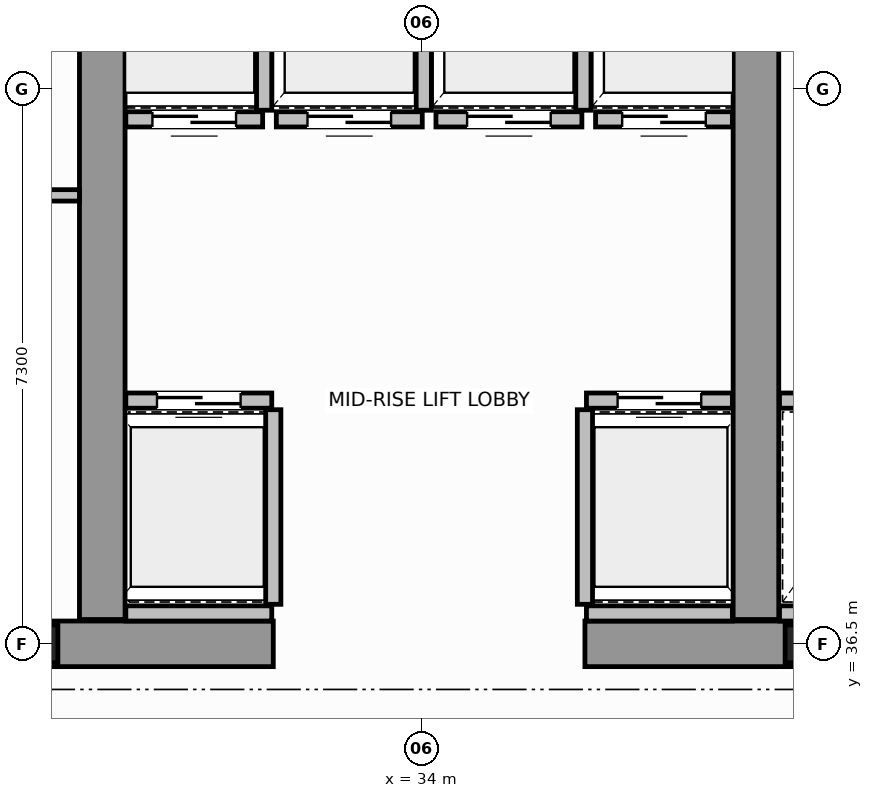
"""IFC4 building model, lengths in metres.
Left out: names, types, materials, properties, quantities, classifications, styles, units other than length and angle.
Written with IfcOpenShell. Run it as: python <this file> out.ifc"""

import sys

from ifc_helpers import new_model, si_unit, direction, frame, frame_2d, origin, origin_2d, place, context, subcontext, project, spatial, rectangle, i_section, extrude, source, transform, mapped, element, fill, save


model = new_model("IFC4")
c1 = context("Model", 3, precision=1e-05, world=origin(), true_north=direction((0.0, 1.0)))
c2 = subcontext(c1, "Body", "Model", "MODEL_VIEW")
j1 = project(units=[si_unit("LENGTHUNIT", "METRE"), si_unit("PLANEANGLEUNIT", "RADIAN")], contexts=[c1])
p1 = place(None, origin())
s1 = spatial("IfcSite", under=j1, at=p1, CompositionType="ELEMENT")
p2 = place(p1, origin())
s2 = spatial("IfcBuilding", under=s1, at=p2, CompositionType="ELEMENT")
p3 = place(p2, frame((0.0, 0.0, 172.8)))
s3 = spatial("IfcBuildingStorey", under=s2, at=p3, CompositionType="ELEMENT", Elevation=172.8)
m1 = source(origin(), c2, "Body", "SweptSolid", [
    extrude(i_section(OverallWidth=0.432, OverallDepth=0.498, WebThickness=0.055, FlangeThickness=0.068, FilletRadius=0.015, at=origin_2d()), origin(), (0.0, 0.0, 1.0), 3.8),
])
for number, where, z_axis, x_axis in (
    (1, (29.0, 36.5, 0.0), (0.0, 0.0, 1.0), (1.0, 0.0, 0.0)),
    (2, (39.0, 36.5, 0.0), (0.0, 0.0, 1.0), (1.0, 0.0, 0.0)),
):
    element("IfcColumn", number, at=place(p3, frame(where, z_axis=z_axis, x_axis=x_axis)), inside=s3, PredefinedType="COLUMN", context=c2, shape_type="MappedRepresentation", body=[
        mapped(m1, transform((0.0, 0.0, 0.0), scale=1.0)),
    ])
for number, where, z_axis, x_axis in (
    (3, (27.55, 36.5, 0.0), (0.0, 0.0, 1.0), (1.0, 0.0, 0.0)),
    (4, (36.15, 36.5, 0.0), (0.0, 0.0, 1.0), (1.0, 0.0, 0.0)),
):
    element("IfcWall", number, at=place(p3, frame(where, z_axis=z_axis, x_axis=x_axis)), inside=s3, PredefinedType="SHEAR", context=c2, shape_type="SweptSolid", body=[
        extrude(rectangle(XDim=4.5, YDim=0.6, at=frame_2d((2.25, 0.0))), origin(), (0.0, 0.0, 1.0), 3.8),
    ])
for number, where, z_axis, x_axis in (
    (5, (29.8, 36.82, 0.0), (0.0, 0.0, 1.0), (0.0, 1.0, 0.0)),
    (6, (38.4, 36.82, 0.0), (0.0, 0.0, 1.0), (0.0, 1.0, 0.0)),
):
    element("IfcWall", number, at=place(p3, frame(where, z_axis=z_axis, x_axis=x_axis)), inside=s3, PredefinedType="SHEAR", context=c2, shape_type="SweptSolid", body=[
        extrude(rectangle(XDim=9.38, YDim=0.6, at=frame_2d((4.69, 0.0))), origin(), (0.0, 0.0, 1.0), 3.8),
    ])
p4 = place(p3, frame((30.11, 39.7, 0.0), z_axis=(0.0, 0.0, 1.0), x_axis=(1.0, 0.0, 0.0)))
e7 = element("IfcWall", 7, at=p4, inside=s3, PredefinedType="SOLIDWALL", context=c2, shape_type="SweptSolid", body=[
    extrude(rectangle(XDim=1.92, YDim=0.2, at=frame_2d((0.96, 0.0))), origin(), (0.0, 0.0, 1.0), 3.58),
])
p5 = place(p4, frame((0.41, 0.0, 0.0)))
e8 = element("IfcOpeningElement", 8, at=p5, cuts=e7, PredefinedType="OPENING", context=c2, shape_type="SweptSolid", body=[
    extrude(rectangle(XDim=1.1, YDim=2.15, at=frame_2d((0.55, 1.075))), frame((0.0, 0.11, 0.0), z_axis=(0.0, -1.0, 0.0), x_axis=(1.0, 0.0, 0.0)), (0.0, 0.0, 1.0), 0.22),
])
p6 = place(p3, frame((30.11, 36.9, 0.0), z_axis=(0.0, 0.0, 1.0), x_axis=(1.0, 0.0, 0.0)))
e9 = element("IfcWall", 9, at=p6, inside=s3, PredefinedType="SOLIDWALL", context=c2, shape_type="SweptSolid", body=[
    extrude(rectangle(XDim=1.92, YDim=0.2, at=frame_2d((0.96, 0.0))), origin(), (0.0, 0.0, 1.0), 3.58),
])
p7 = place(p3, frame((32.05, 37.02, 0.0), z_axis=(0.0, 0.0, 1.0), x_axis=(0.0, 1.0, 0.0)))
e10 = element("IfcWall", 10, at=p7, inside=s3, PredefinedType="SOLIDWALL", context=c2, shape_type="SweptSolid", body=[
    extrude(rectangle(XDim=2.56, YDim=0.2, at=frame_2d((1.28, 0.0))), origin(), (0.0, 0.0, 1.0), 3.58),
])
p8 = place(p3, frame((36.17, 39.7, 0.0), z_axis=(0.0, 0.0, 1.0), x_axis=(1.0, 0.0, 0.0)))
e11 = element("IfcWall", 11, at=p8, inside=s3, PredefinedType="SOLIDWALL", context=c2, shape_type="SweptSolid", body=[
    extrude(rectangle(XDim=1.92, YDim=0.2, at=frame_2d((0.96, 0.0))), origin(), (0.0, 0.0, 1.0), 3.58),
])
p9 = place(p8, frame((0.41, 0.0, 0.0)))
e12 = element("IfcOpeningElement", 12, at=p9, cuts=e11, PredefinedType="OPENING", context=c2, shape_type="SweptSolid", body=[
    extrude(rectangle(XDim=1.1, YDim=2.15, at=frame_2d((0.55, 1.075))), frame((0.0, 0.11, 0.0), z_axis=(0.0, -1.0, 0.0), x_axis=(1.0, 0.0, 0.0)), (0.0, 0.0, 1.0), 0.22),
])
p10 = place(p3, frame((36.17, 36.9, 0.0), z_axis=(0.0, 0.0, 1.0), x_axis=(1.0, 0.0, 0.0)))
e13 = element("IfcWall", 13, at=p10, inside=s3, PredefinedType="SOLIDWALL", context=c2, shape_type="SweptSolid", body=[
    extrude(rectangle(XDim=1.92, YDim=0.2, at=frame_2d((0.96, 0.0))), origin(), (0.0, 0.0, 1.0), 3.58),
])
p11 = place(p3, frame((36.15, 37.02, 0.0), z_axis=(0.0, 0.0, 1.0), x_axis=(0.0, 1.0, 0.0)))
e14 = element("IfcWall", 14, at=p11, inside=s3, PredefinedType="SOLIDWALL", context=c2, shape_type="SweptSolid", body=[
    extrude(rectangle(XDim=2.56, YDim=0.2, at=frame_2d((1.28, 0.0))), origin(), (0.0, 0.0, 1.0), 3.58),
])
p12 = place(p3, frame((30.11, 43.4, 0.0), z_axis=(0.0, 0.0, 1.0), x_axis=(1.0, 0.0, 0.0)))
e15 = element("IfcWall", 15, at=p12, inside=s3, PredefinedType="SOLIDWALL", context=c2, shape_type="SweptSolid", body=[
    extrude(rectangle(XDim=1.8, YDim=0.2, at=frame_2d((0.9, 0.0))), origin(), (0.0, 0.0, 1.0), 3.58),
])
p13 = place(p12, frame((0.35, 0.0, 0.0)))
e16 = element("IfcOpeningElement", 16, at=p13, cuts=e15, PredefinedType="OPENING", context=c2, shape_type="SweptSolid", body=[
    extrude(rectangle(XDim=1.1, YDim=2.15, at=frame_2d((0.55, 1.075))), frame((0.0, 0.11, 0.0), z_axis=(0.0, -1.0, 0.0), x_axis=(1.0, 0.0, 0.0)), (0.0, 0.0, 1.0), 0.22),
])
p14 = place(p3, frame((31.93, 43.52, 0.0), z_axis=(0.0, 0.0, 1.0), x_axis=(0.0, 1.0, 0.0)))
e17 = element("IfcWall", 17, at=p14, inside=s3, PredefinedType="SOLIDWALL", context=c2, shape_type="SweptSolid", body=[
    extrude(rectangle(XDim=2.56, YDim=0.2, at=frame_2d((1.28, 0.0))), origin(), (0.0, 0.0, 1.0), 3.58),
])
p15 = place(p3, frame((32.09, 43.4, 0.0), z_axis=(0.0, 0.0, 1.0), x_axis=(1.0, 0.0, 0.0)))
e18 = element("IfcWall", 18, at=p15, inside=s3, PredefinedType="SOLIDWALL", context=c2, shape_type="SweptSolid", body=[
    extrude(rectangle(XDim=1.92, YDim=0.2, at=frame_2d((0.96, 0.0))), origin(), (0.0, 0.0, 1.0), 3.58),
])
p16 = place(p15, frame((0.41, 0.0, 0.0)))
e19 = element("IfcOpeningElement", 19, at=p16, cuts=e18, PredefinedType="OPENING", context=c2, shape_type="SweptSolid", body=[
    extrude(rectangle(XDim=1.1, YDim=2.15, at=frame_2d((0.55, 1.075))), frame((0.0, 0.11, 0.0), z_axis=(0.0, -1.0, 0.0), x_axis=(1.0, 0.0, 0.0)), (0.0, 0.0, 1.0), 0.22),
])
p17 = place(p3, frame((34.03, 43.52, 0.0), z_axis=(0.0, 0.0, 1.0), x_axis=(0.0, 1.0, 0.0)))
e20 = element("IfcWall", 20, at=p17, inside=s3, PredefinedType="SOLIDWALL", context=c2, shape_type="SweptSolid", body=[
    extrude(rectangle(XDim=2.56, YDim=0.2, at=frame_2d((1.28, 0.0))), origin(), (0.0, 0.0, 1.0), 3.58),
])
p18 = place(p3, frame((34.19, 43.4, 0.0), z_axis=(0.0, 0.0, 1.0), x_axis=(1.0, 0.0, 0.0)))
e21 = element("IfcWall", 21, at=p18, inside=s3, PredefinedType="SOLIDWALL", context=c2, shape_type="SweptSolid", body=[
    extrude(rectangle(XDim=1.92, YDim=0.2, at=frame_2d((0.96, 0.0))), origin(), (0.0, 0.0, 1.0), 3.58),
])
p19 = place(p18, frame((0.41, 0.0, 0.0)))
e22 = element("IfcOpeningElement", 22, at=p19, cuts=e21, PredefinedType="OPENING", context=c2, shape_type="SweptSolid", body=[
    extrude(rectangle(XDim=1.1, YDim=2.15, at=frame_2d((0.55, 1.075))), frame((0.0, 0.11, 0.0), z_axis=(0.0, -1.0, 0.0), x_axis=(1.0, 0.0, 0.0)), (0.0, 0.0, 1.0), 0.22),
])
p20 = place(p3, frame((36.13, 43.52, 0.0), z_axis=(0.0, 0.0, 1.0), x_axis=(0.0, 1.0, 0.0)))
e23 = element("IfcWall", 23, at=p20, inside=s3, PredefinedType="SOLIDWALL", context=c2, shape_type="SweptSolid", body=[
    extrude(rectangle(XDim=2.56, YDim=0.2, at=frame_2d((1.28, 0.0))), origin(), (0.0, 0.0, 1.0), 3.58),
])
p21 = place(p3, frame((36.29, 43.4, 0.0), z_axis=(0.0, 0.0, 1.0), x_axis=(1.0, 0.0, 0.0)))
e24 = element("IfcWall", 24, at=p21, inside=s3, PredefinedType="SOLIDWALL", context=c2, shape_type="SweptSolid", body=[
    extrude(rectangle(XDim=1.8, YDim=0.2, at=frame_2d((0.9, 0.0))), origin(), (0.0, 0.0, 1.0), 3.58),
])
p22 = place(p21, frame((0.35, 0.0, 0.0)))
e25 = element("IfcOpeningElement", 25, at=p22, cuts=e24, PredefinedType="OPENING", context=c2, shape_type="SweptSolid", body=[
    extrude(rectangle(XDim=1.1, YDim=2.15, at=frame_2d((0.55, 1.075))), frame((0.0, 0.11, 0.0), z_axis=(0.0, -1.0, 0.0), x_axis=(1.0, 0.0, 0.0)), (0.0, 0.0, 1.0), 0.22),
])
for number, where, z_axis, x_axis in (
    (26, (38.71, 39.7, 0.0), (0.0, 0.0, 1.0), (1.0, 0.0, 0.0)),
    (27, (38.71, 36.9, 0.0), (0.0, 0.0, 1.0), (1.0, 0.0, 0.0)),
):
    element("IfcWall", number, at=place(p3, frame(where, z_axis=z_axis, x_axis=x_axis)), inside=s3, PredefinedType="SOLIDWALL", context=c2, shape_type="SweptSolid", body=[
        extrude(rectangle(XDim=1.92, YDim=0.2, at=frame_2d((0.96, 0.0))), origin(), (0.0, 0.0, 1.0), 3.58),
    ])
p23 = place(p3, frame((21.5, 42.4, 0.0), z_axis=(0.0, 0.0, 1.0), x_axis=(1.0, 0.0, 0.0)))
e28 = element("IfcWall", 28, at=p23, inside=s3, PredefinedType="PARTITIONING", context=c2, shape_type="SweptSolid", body=[
    extrude(rectangle(XDim=8.0, YDim=0.15, at=frame_2d((4.0, 0.0))), origin(), (0.0, 0.0, 1.0), 3.58),
])
p24 = place(p23, frame((3.4, 0.0, 0.0)))
e29 = element("IfcOpeningElement", 29, at=p24, cuts=e28, PredefinedType="OPENING", context=c2, shape_type="SweptSolid", body=[
    extrude(rectangle(XDim=0.9, YDim=2.1, at=frame_2d((0.45, 1.05))), frame((0.0, 0.085, 0.0), z_axis=(0.0, -1.0, 0.0), x_axis=(1.0, 0.0, 0.0)), (0.0, 0.0, 1.0), 0.17),
])
m2 = source(origin(), c2, "Body", "SweptSolid", [
    extrude(rectangle(XDim=1.1, YDim=2.15, at=frame_2d((0.55, 1.075))), frame((0.0, 0.025, 0.0), z_axis=(0.0, -1.0, 0.0), x_axis=(1.0, 0.0, 0.0)), (0.0, 0.0, 1.0), 0.05),
])
p25 = place(p5, origin())
e30 = element("IfcDoor", 30, at=p25, inside=s3, OperationType="DOUBLE_DOOR_SLIDING", PredefinedType="DOOR", context=c2, shape_type="MappedRepresentation", body=[
    mapped(m2, transform((0.0, 0.0, 0.0), scale=1.0)),
])
fill(e8, e30)
p26 = place(p9, origin())
e31 = element("IfcDoor", 31, at=p26, inside=s3, OperationType="DOUBLE_DOOR_SLIDING", PredefinedType="DOOR", context=c2, shape_type="MappedRepresentation", body=[
    mapped(m2, transform((0.0, 0.0, 0.0), scale=1.0)),
])
fill(e12, e31)
p27 = place(p13, origin())
e32 = element("IfcDoor", 32, at=p27, inside=s3, OperationType="DOUBLE_DOOR_SLIDING", PredefinedType="DOOR", context=c2, shape_type="MappedRepresentation", body=[
    mapped(m2, transform((0.0, 0.0, 0.0), scale=1.0)),
])
fill(e16, e32)
p28 = place(p16, origin())
e33 = element("IfcDoor", 33, at=p28, inside=s3, OperationType="DOUBLE_DOOR_SLIDING", PredefinedType="DOOR", context=c2, shape_type="MappedRepresentation", body=[
    mapped(m2, transform((0.0, 0.0, 0.0), scale=1.0)),
])
fill(e19, e33)
p29 = place(p19, origin())
e34 = element("IfcDoor", 34, at=p29, inside=s3, OperationType="DOUBLE_DOOR_SLIDING", PredefinedType="DOOR", context=c2, shape_type="MappedRepresentation", body=[
    mapped(m2, transform((0.0, 0.0, 0.0), scale=1.0)),
])
fill(e22, e34)
p30 = place(p22, origin())
e35 = element("IfcDoor", 35, at=p30, inside=s3, OperationType="DOUBLE_DOOR_SLIDING", PredefinedType="DOOR", context=c2, shape_type="MappedRepresentation", body=[
    mapped(m2, transform((0.0, 0.0, 0.0), scale=1.0)),
])
fill(e25, e35)
save(model, sys.argv[1])
